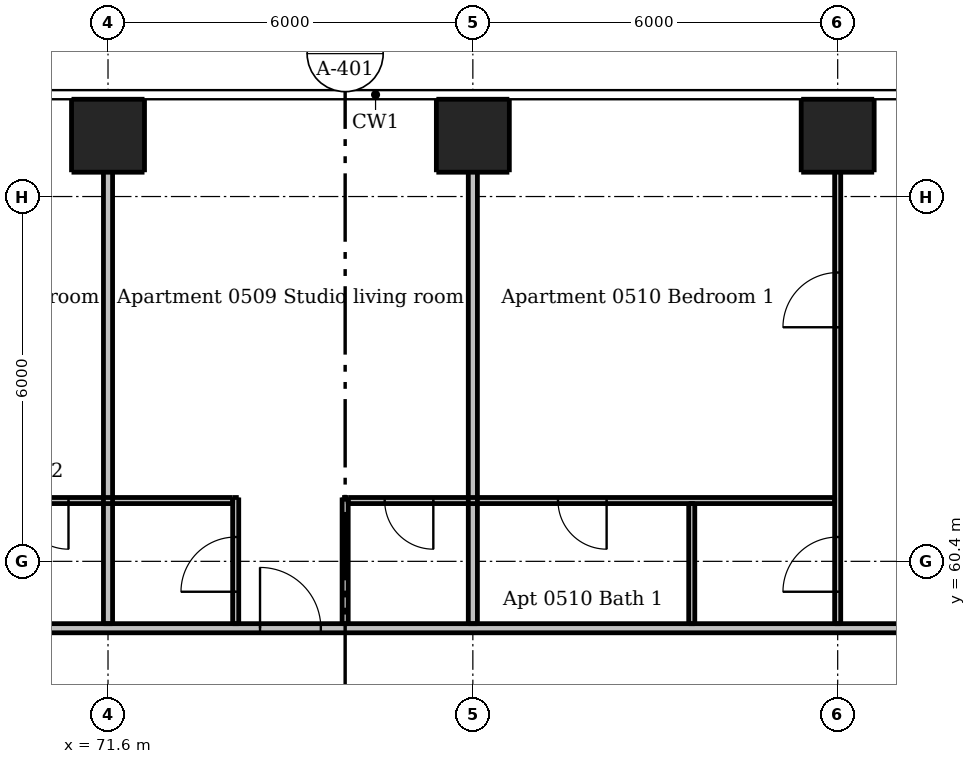
"""IFC4 building model, lengths in metres.
Left out: names, types, materials, properties, quantities, classifications, styles, units other than length and angle.
Written with IfcOpenShell. Run it as: python <this file> out.ifc"""

import sys

from ifc_helpers import new_model, si_unit, direction, frame, frame_2d, origin, origin_2d, place, context, subcontext, project, spatial, rectangle, extrude, element, fill, save


model = new_model("IFC4")
c1 = context("Model", 3, precision=1e-05, world=origin(), true_north=direction((0.0, 1.0)))
c2 = subcontext(c1, "Body", "Model", "MODEL_VIEW")
j1 = project(units=[si_unit("LENGTHUNIT", "METRE"), si_unit("PLANEANGLEUNIT", "RADIAN")], contexts=[c1])
p1 = place(None, origin())
s1 = spatial("IfcSite", under=j1, at=p1, CompositionType="ELEMENT")
p2 = place(p1, origin())
s2 = spatial("IfcBuilding", under=s1, at=p2, CompositionType="ELEMENT")
p3 = place(p2, frame((0.0, 0.0, 23.5)))
s3 = spatial("IfcBuildingStorey", under=s2, at=p3, CompositionType="ELEMENT", Elevation=23.5)
for number, where, z_axis, x_axis in (
    (1, (71.6, 67.4, 0.0), (0.0, 0.0, 1.0), (1.0, 0.0, 0.0)),
    (2, (77.6, 67.4, 0.0), (0.0, 0.0, 1.0), (1.0, 0.0, 0.0)),
    (3, (83.6, 67.4, 0.0), (0.0, 0.0, 1.0), (1.0, 0.0, 0.0)),
):
    element("IfcColumn", number, at=place(p3, frame(where, z_axis=z_axis, x_axis=x_axis)), inside=s3, PredefinedType="COLUMN", context=c2, shape_type="SweptSolid", body=[
        extrude(rectangle(XDim=1.2, YDim=1.2, at=origin_2d()), origin(), (0.0, 0.0, 1.0), 3.05),
    ])
p4 = place(p3, frame((73.7, 59.375, 0.0), z_axis=(0.0, 0.0, 1.0), x_axis=(0.0, 1.0, 0.0)))
e4 = element("IfcWall", 4, at=p4, inside=s3, PredefinedType="PARTITIONING", context=c2, shape_type="SweptSolid", body=[
    extrude(rectangle(XDim=2.075, YDim=0.1, at=frame_2d((1.038, 0.0))), origin(), (0.0, 0.0, 1.0), 3.05),
])
p5 = place(p4, frame((0.525, 0.0, 0.0)))
e5 = element("IfcOpeningElement", 5, at=p5, cuts=e4, PredefinedType="OPENING", context=c2, shape_type="SweptSolid", body=[
    extrude(rectangle(XDim=0.9, YDim=2.1, at=frame_2d((0.45, 1.05))), frame((0.0, 0.06, 0.0), z_axis=(0.0, -1.0, 0.0), x_axis=(1.0, 0.0, 0.0)), (0.0, 0.0, 1.0), 0.12),
])
p6 = place(p3, frame((75.5, 59.375, 0.0), z_axis=(0.0, 0.0, 1.0), x_axis=(0.0, 1.0, 0.0)))
e6 = element("IfcWall", 6, at=p6, inside=s3, PredefinedType="PARTITIONING", context=c2, shape_type="SweptSolid", body=[
    extrude(rectangle(XDim=2.075, YDim=0.1, at=frame_2d((1.038, 0.0))), origin(), (0.0, 0.0, 1.0), 3.05),
])
p7 = place(p3, frame((81.2, 59.375, 0.0), z_axis=(0.0, 0.0, 1.0), x_axis=(0.0, 1.0, 0.0)))
e7 = element("IfcWall", 7, at=p7, inside=s3, PredefinedType="PARTITIONING", context=c2, shape_type="SweptSolid", body=[
    extrude(rectangle(XDim=1.975, YDim=0.1, at=frame_2d((0.988, 0.0))), origin(), (0.0, 0.0, 1.0), 3.05),
])
p8 = place(p3, frame((83.6, 59.375, 0.0), z_axis=(0.0, 0.0, 1.0), x_axis=(0.0, 1.0, 0.0)))
e8 = element("IfcWall", 8, at=p8, inside=s3, PredefinedType="PARTITIONING", context=c2, shape_type="SweptSolid", body=[
    extrude(rectangle(XDim=8.625, YDim=0.1, at=frame_2d((4.312, 0.0))), origin(), (0.0, 0.0, 1.0), 2.516),
])
p9 = place(p8, frame((0.525, 0.0, 0.0)))
e9 = element("IfcOpeningElement", 9, at=p9, cuts=e8, PredefinedType="OPENING", context=c2, shape_type="SweptSolid", body=[
    extrude(rectangle(XDim=0.9, YDim=2.1, at=frame_2d((0.45, 1.05))), frame((0.0, 0.06, 0.0), z_axis=(0.0, -1.0, 0.0), x_axis=(1.0, 0.0, 0.0)), (0.0, 0.0, 1.0), 0.12),
])
p10 = place(p8, frame((4.875, 0.0, 0.0)))
e10 = element("IfcOpeningElement", 10, at=p10, cuts=e8, PredefinedType="OPENING", context=c2, shape_type="SweptSolid", body=[
    extrude(rectangle(XDim=0.9, YDim=2.1, at=frame_2d((0.45, 1.05))), frame((0.0, 0.06, 0.0), z_axis=(0.0, -1.0, 0.0), x_axis=(1.0, 0.0, 0.0)), (0.0, 0.0, 1.0), 0.12),
])
p11 = place(p3, frame((73.65, 61.4, 0.0), z_axis=(0.0, 0.0, 1.0), x_axis=(-1.0, 0.0, 0.0)))
e11 = element("IfcWall", 11, at=p11, inside=s3, PredefinedType="PARTITIONING", context=c2, shape_type="SweptSolid", body=[
    extrude(rectangle(XDim=4.1, YDim=0.1, at=frame_2d((2.05, 0.0))), origin(), (0.0, 0.0, 1.0), 3.05),
])
p12 = place(p11, frame((2.7, 0.0, 0.0)))
e12 = element("IfcOpeningElement", 12, at=p12, cuts=e11, PredefinedType="OPENING", context=c2, shape_type="SweptSolid", body=[
    extrude(rectangle(XDim=0.8, YDim=2.1, at=frame_2d((0.4, 1.05))), frame((0.0, 0.06, 0.0), z_axis=(0.0, -1.0, 0.0), x_axis=(1.0, 0.0, 0.0)), (0.0, 0.0, 1.0), 0.12),
])
p13 = place(p3, frame((83.55, 61.4, 0.0), z_axis=(0.0, 0.0, 1.0), x_axis=(-1.0, 0.0, 0.0)))
e13 = element("IfcWall", 13, at=p13, inside=s3, PredefinedType="PARTITIONING", context=c2, shape_type="SweptSolid", body=[
    extrude(rectangle(XDim=8.0, YDim=0.1, at=frame_2d((4.0, 0.0))), origin(), (0.0, 0.0, 1.0), 3.05),
])
p14 = place(p13, frame((6.6, 0.0, 0.0)))
e14 = element("IfcOpeningElement", 14, at=p14, cuts=e13, PredefinedType="OPENING", context=c2, shape_type="SweptSolid", body=[
    extrude(rectangle(XDim=0.8, YDim=2.1, at=frame_2d((0.4, 1.05))), frame((0.0, 0.06, 0.0), z_axis=(0.0, -1.0, 0.0), x_axis=(1.0, 0.0, 0.0)), (0.0, 0.0, 1.0), 0.12),
])
p15 = place(p13, frame((3.75, 0.0, 0.0)))
e15 = element("IfcOpeningElement", 15, at=p15, cuts=e13, PredefinedType="OPENING", context=c2, shape_type="SweptSolid", body=[
    extrude(rectangle(XDim=0.8, YDim=2.1, at=frame_2d((0.4, 1.05))), frame((0.0, 0.06, 0.0), z_axis=(0.0, -1.0, 0.0), x_axis=(1.0, 0.0, 0.0)), (0.0, 0.0, 1.0), 0.12),
])
for number, where, z_axis, x_axis in (
    (16, (71.6, 59.375, 0.0), (0.0, 0.0, 1.0), (0.0, 1.0, 0.0)),
    (17, (77.6, 59.375, 0.0), (0.0, 0.0, 1.0), (0.0, 1.0, 0.0)),
):
    element("IfcWall", number, at=place(p3, frame(where, z_axis=z_axis, x_axis=x_axis)), inside=s3, PredefinedType="PARTITIONING", context=c2, shape_type="SweptSolid", body=[
        extrude(rectangle(XDim=8.625, YDim=0.15, at=frame_2d((4.312, 0.0))), origin(), (0.0, 0.0, 1.0), 2.516),
    ])
p16 = place(p3, frame((59.675, 59.3, 0.0), z_axis=(0.0, 0.0, 1.0), x_axis=(1.0, 0.0, 0.0)))
e18 = element("IfcWall", 18, at=p16, inside=s3, PredefinedType="PARTITIONING", context=c2, shape_type="SweptSolid", body=[
    extrude(rectangle(XDim=28.55, YDim=0.15, at=frame_2d((14.275, 0.0))), origin(), (0.0, 0.0, 1.0), 3.05),
])
p17 = place(p16, frame((2.425, 0.0, 0.0)))
e19 = element("IfcOpeningElement", 19, at=p17, cuts=e18, PredefinedType="OPENING", context=c2, shape_type="SweptSolid", body=[
    extrude(rectangle(XDim=1.0, YDim=2.1, at=frame_2d((0.5, 1.05))), frame((0.0, 0.085, 0.0), z_axis=(0.0, -1.0, 0.0), x_axis=(1.0, 0.0, 0.0)), (0.0, 0.0, 1.0), 0.17),
])
p18 = place(p16, frame((8.425, 0.0, 0.0)))
e20 = element("IfcOpeningElement", 20, at=p18, cuts=e18, PredefinedType="OPENING", context=c2, shape_type="SweptSolid", body=[
    extrude(rectangle(XDim=1.0, YDim=2.1, at=frame_2d((0.5, 1.05))), frame((0.0, 0.085, 0.0), z_axis=(0.0, -1.0, 0.0), x_axis=(1.0, 0.0, 0.0)), (0.0, 0.0, 1.0), 0.17),
])
p19 = place(p16, frame((14.425, 0.0, 0.0)))
e21 = element("IfcOpeningElement", 21, at=p19, cuts=e18, PredefinedType="OPENING", context=c2, shape_type="SweptSolid", body=[
    extrude(rectangle(XDim=1.0, YDim=2.1, at=frame_2d((0.5, 1.05))), frame((0.0, 0.085, 0.0), z_axis=(0.0, -1.0, 0.0), x_axis=(1.0, 0.0, 0.0)), (0.0, 0.0, 1.0), 0.17),
])
p20 = place(p16, frame((25.775, 0.0, 0.0)))
e22 = element("IfcOpeningElement", 22, at=p20, cuts=e18, PredefinedType="OPENING", context=c2, shape_type="SweptSolid", body=[
    extrude(rectangle(XDim=1.0, YDim=2.1, at=frame_2d((0.5, 1.05))), frame((0.0, 0.085, 0.0), z_axis=(0.0, -1.0, 0.0), x_axis=(1.0, 0.0, 0.0)), (0.0, 0.0, 1.0), 0.17),
])
p21 = place(p3, frame((67.558, 68.5, 0.0), z_axis=(0.0, 0.0, 1.0), x_axis=(1.0, 0.0, 0.0)))
e23 = element("IfcWall", 23, at=p21, inside=s3, PredefinedType="PARAPET", context=c2, shape_type="SweptSolid", body=[
    extrude(rectangle(XDim=23.95, YDim=0.2, at=frame_2d((11.975, 0.0))), origin(), (0.0, 0.0, 1.0), 1.1),
])
p22 = place(p12, origin())
e24 = element("IfcDoor", 24, at=p22, inside=s3, OperationType="SINGLE_SWING_LEFT", PredefinedType="DOOR", context=c2, shape_type="SweptSolid", body=[
    extrude(rectangle(XDim=0.8, YDim=2.1, at=frame_2d((0.4, 1.05))), frame((0.0, 0.025, 0.0), z_axis=(0.0, -1.0, 0.0), x_axis=(1.0, 0.0, 0.0)), (0.0, 0.0, 1.0), 0.05),
])
fill(e12, e24)
p23 = place(p19, origin())
e25 = element("IfcDoor", 25, at=p23, inside=s3, OperationType="SINGLE_SWING_LEFT", PredefinedType="DOOR", context=c2, shape_type="SweptSolid", body=[
    extrude(rectangle(XDim=1.0, YDim=2.1, at=frame_2d((0.5, 1.05))), frame((0.0, 0.025, 0.0), z_axis=(0.0, -1.0, 0.0), x_axis=(1.0, 0.0, 0.0)), (0.0, 0.0, 1.0), 0.05),
])
fill(e21, e25)
p24 = place(p5, origin())
e26 = element("IfcDoor", 26, at=p24, inside=s3, OperationType="SINGLE_SWING_LEFT", PredefinedType="DOOR", context=c2, shape_type="SweptSolid", body=[
    extrude(rectangle(XDim=0.9, YDim=2.1, at=frame_2d((0.45, 1.05))), frame((0.0, 0.025, 0.0), z_axis=(0.0, -1.0, 0.0), x_axis=(1.0, 0.0, 0.0)), (0.0, 0.0, 1.0), 0.05),
])
fill(e5, e26)
p25 = place(p14, origin())
e27 = element("IfcDoor", 27, at=p25, inside=s3, OperationType="SINGLE_SWING_LEFT", PredefinedType="DOOR", context=c2, shape_type="SweptSolid", body=[
    extrude(rectangle(XDim=0.8, YDim=2.1, at=frame_2d((0.4, 1.05))), frame((0.0, 0.025, 0.0), z_axis=(0.0, -1.0, 0.0), x_axis=(1.0, 0.0, 0.0)), (0.0, 0.0, 1.0), 0.05),
])
fill(e14, e27)
p26 = place(p9, origin())
e28 = element("IfcDoor", 28, at=p26, inside=s3, OperationType="SINGLE_SWING_LEFT", PredefinedType="DOOR", context=c2, shape_type="SweptSolid", body=[
    extrude(rectangle(XDim=0.9, YDim=2.1, at=frame_2d((0.45, 1.05))), frame((0.0, 0.025, 0.0), z_axis=(0.0, -1.0, 0.0), x_axis=(1.0, 0.0, 0.0)), (0.0, 0.0, 1.0), 0.05),
])
fill(e9, e28)
p27 = place(p10, origin())
e29 = element("IfcDoor", 29, at=p27, inside=s3, OperationType="SINGLE_SWING_LEFT", PredefinedType="DOOR", context=c2, shape_type="SweptSolid", body=[
    extrude(rectangle(XDim=0.9, YDim=2.1, at=frame_2d((0.45, 1.05))), frame((0.0, 0.025, 0.0), z_axis=(0.0, -1.0, 0.0), x_axis=(1.0, 0.0, 0.0)), (0.0, 0.0, 1.0), 0.05),
])
fill(e10, e29)
p28 = place(p15, origin())
e30 = element("IfcDoor", 30, at=p28, inside=s3, OperationType="SINGLE_SWING_LEFT", PredefinedType="DOOR", context=c2, shape_type="SweptSolid", body=[
    extrude(rectangle(XDim=0.8, YDim=2.1, at=frame_2d((0.4, 1.05))), frame((0.0, 0.025, 0.0), z_axis=(0.0, -1.0, 0.0), x_axis=(1.0, 0.0, 0.0)), (0.0, 0.0, 1.0), 0.05),
])
fill(e15, e30)
save(model, sys.argv[1])
